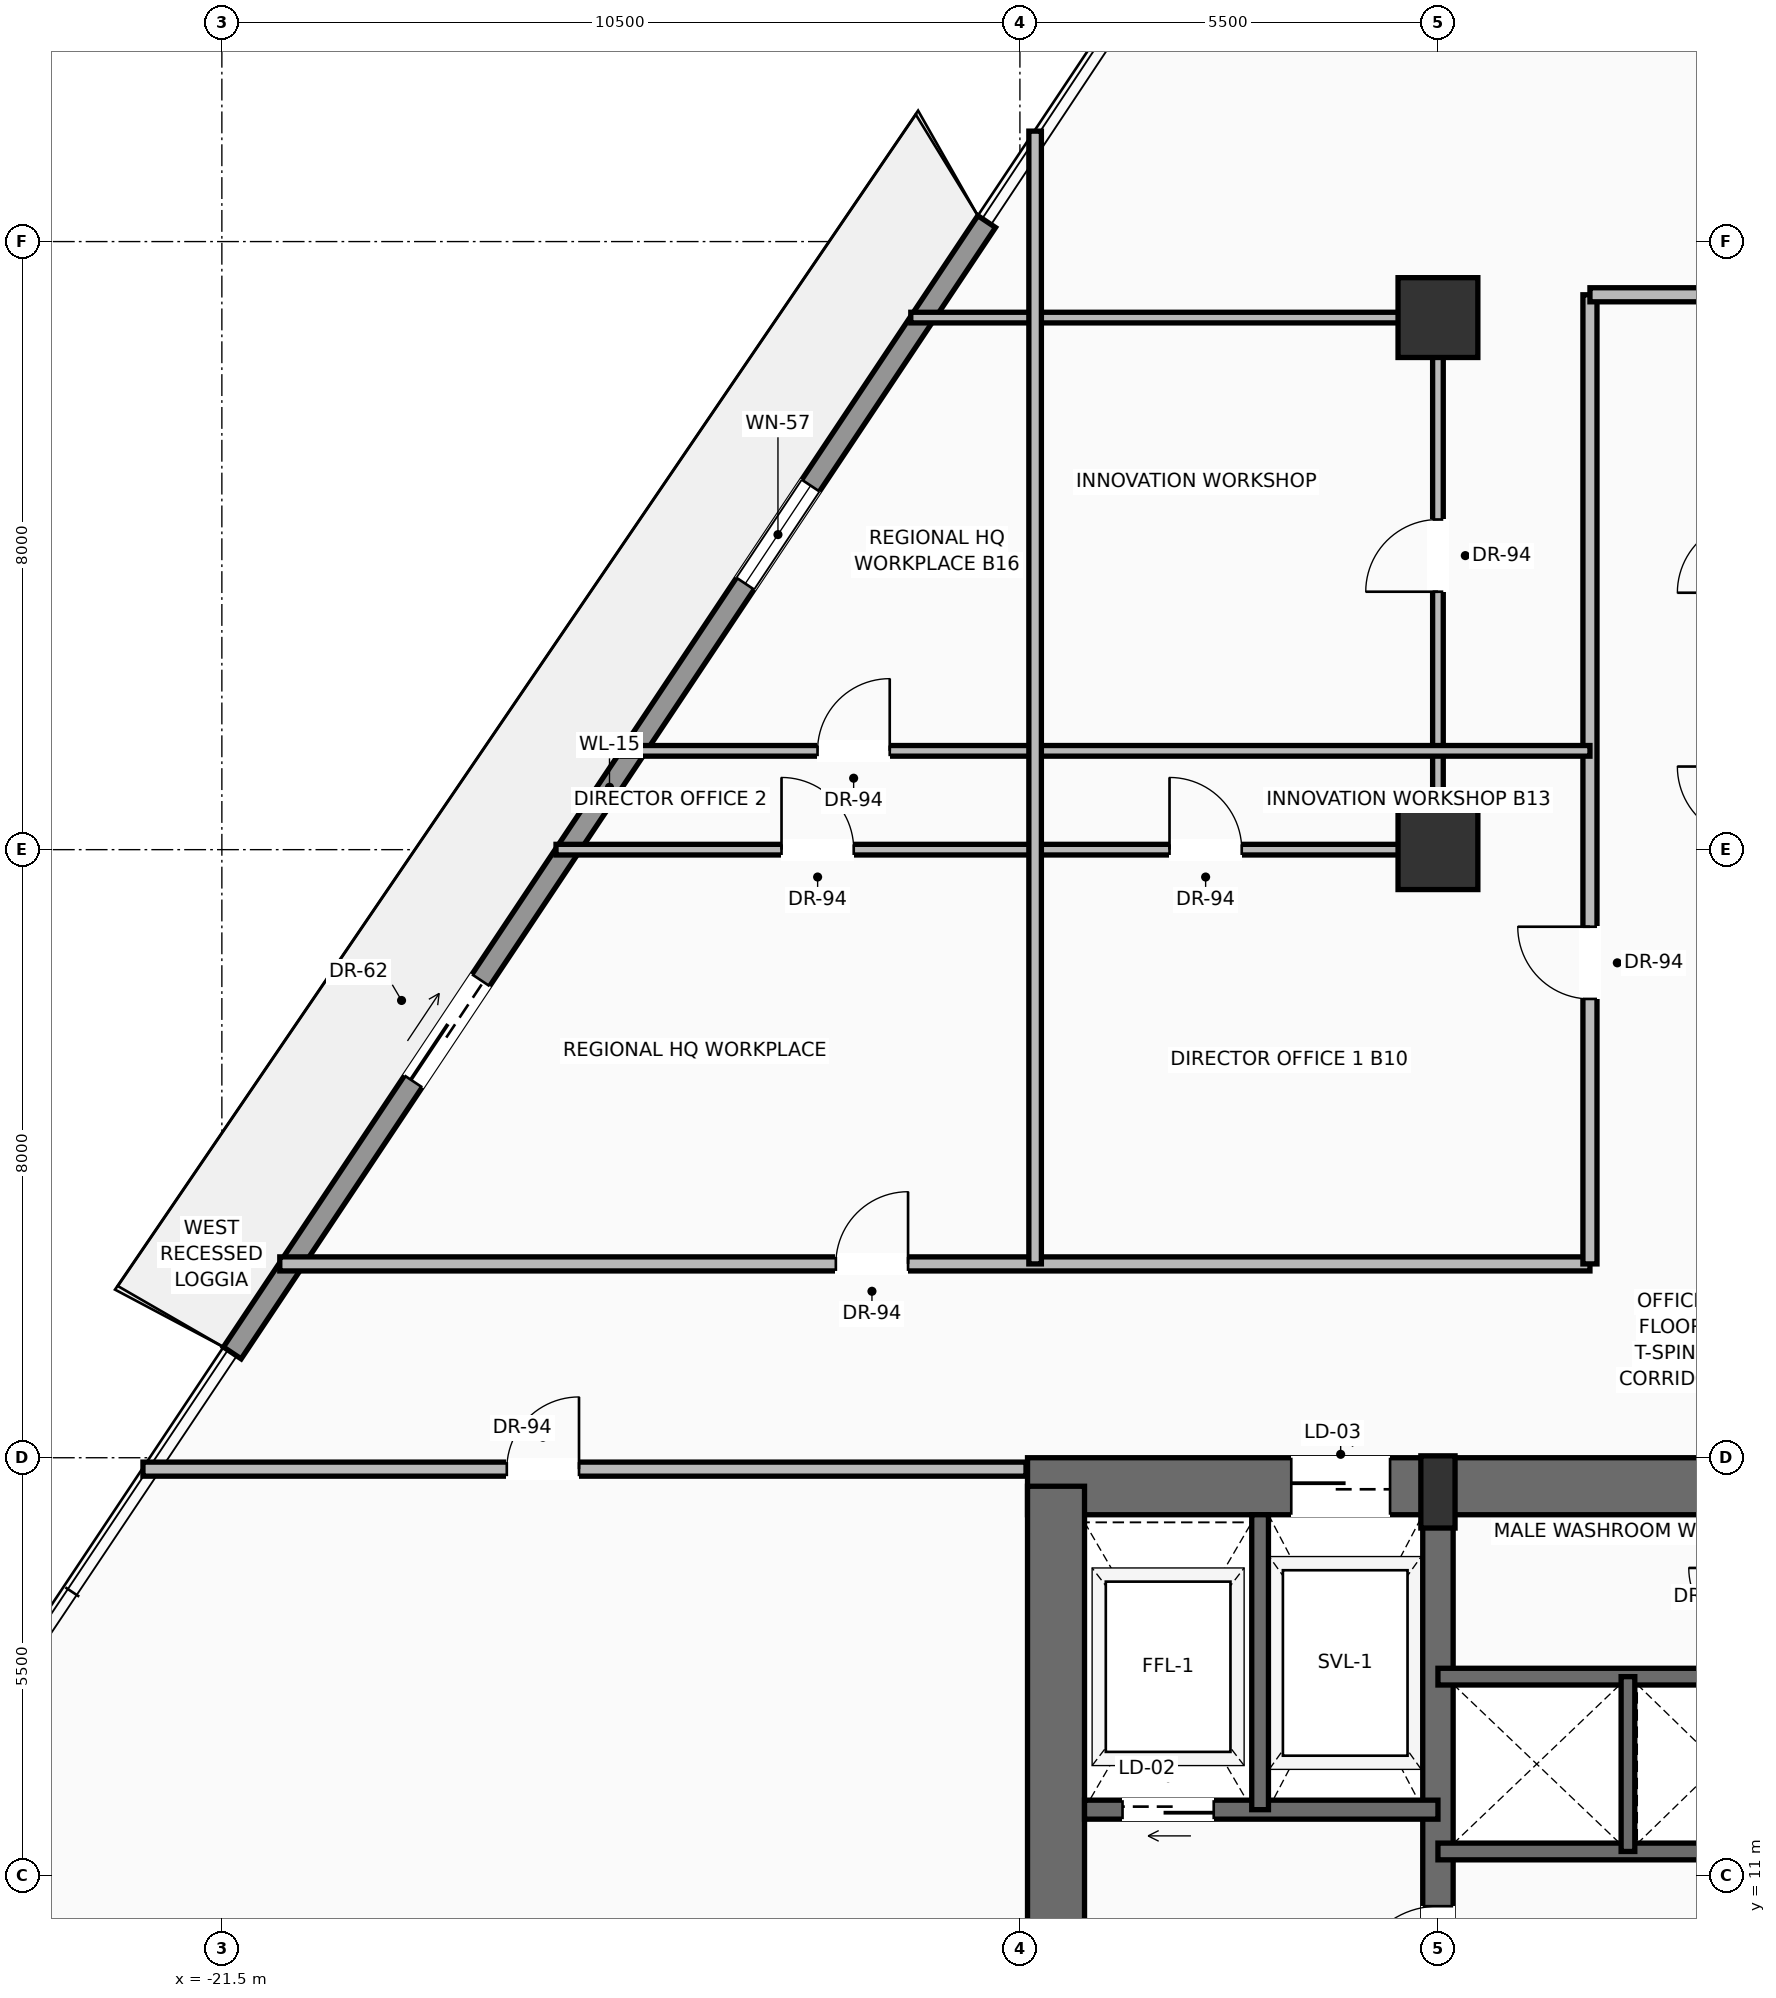
"""IFC4 building model, lengths in metres.
Left out: names, types, materials, properties, quantities, classifications, styles, units other than length and angle.
Written with IfcOpenShell. Run it as: python <this file> out.ifc"""

import sys

from ifc_helpers import new_model, si_unit, direction, frame, frame_2d, origin, origin_2d, place, context, subcontext, project, spatial, rectangle, extrude, source, transform, mapped, element, fill, save


model = new_model("IFC4")
c1 = context("Model", 3, precision=1e-05, world=origin(), true_north=direction((0.0, 1.0)))
c2 = subcontext(c1, "Body", "Model", "MODEL_VIEW")
j1 = project(units=[si_unit("LENGTHUNIT", "METRE"), si_unit("PLANEANGLEUNIT", "RADIAN")], contexts=[c1])
p1 = place(None, origin())
s1 = spatial("IfcSite", under=j1, at=p1, CompositionType="ELEMENT")
p2 = place(p1, origin())
s2 = spatial("IfcBuilding", under=s1, at=p2, CompositionType="ELEMENT")
p3 = place(p2, frame((0.0, 0.0, 109.9)))
s3 = spatial("IfcBuildingStorey", under=s2, at=p3, CompositionType="ELEMENT", Elevation=109.9)
p4 = place(p3, frame((-10.9, 16.125, 0.0), z_axis=(0.0, 0.0, 1.0), x_axis=(1.0, 0.0, 0.0)))
e1 = element("IfcWall", 1, at=p4, inside=s3, PredefinedType="SHEAR", context=c2, shape_type="SweptSolid", body=[
    extrude(rectangle(XDim=21.8, YDim=0.75, at=frame_2d((10.9, 0.0))), origin(), (0.0, 0.0, 1.0), 3.45),
])
p5 = place(p4, frame((3.47, 0.0, 0.0)))
e2 = element("IfcOpeningElement", 2, at=p5, cuts=e1, PredefinedType="OPENING", context=c2, shape_type="SweptSolid", body=[
    extrude(rectangle(XDim=1.3, YDim=2.3, at=frame_2d((0.65, 1.15))), frame((0.0, 0.385, 0.0), z_axis=(0.0, -1.0, 0.0), x_axis=(1.0, 0.0, 0.0)), (0.0, 0.0, 1.0), 0.77),
])
p6 = place(p4, frame((9.9, 0.0, 0.0)))
e3 = element("IfcOpeningElement", 3, at=p6, cuts=e1, PredefinedType="OPENING", context=c2, shape_type="SweptSolid", body=[
    extrude(rectangle(XDim=2.0, YDim=2.4, at=frame_2d((1.0, 1.2))), frame((0.0, 0.385, 0.0), z_axis=(0.0, -1.0, 0.0), x_axis=(1.0, 0.0, 0.0)), (0.0, 0.0, 1.0), 0.77),
])
p7 = place(p3, frame((-10.525, 0.475, 0.0), z_axis=(0.0, 0.0, 1.0), x_axis=(0.0, 1.0, 0.0)))
e4 = element("IfcWall", 4, at=p7, inside=s3, PredefinedType="SHEAR", context=c2, shape_type="SweptSolid", body=[
    extrude(rectangle(XDim=15.65, YDim=0.75, at=frame_2d((7.825, 0.0))), origin(), (0.0, 0.0, 1.0), 3.45),
])
p8 = place(p3, frame((-5.5, 0.475, 0.0), z_axis=(0.0, 0.0, 1.0), x_axis=(0.0, 1.0, 0.0)))
e5 = element("IfcWall", 5, at=p8, inside=s3, PredefinedType="SHEAR", context=c2, shape_type="SweptSolid", body=[
    extrude(rectangle(XDim=15.65, YDim=0.4, at=frame_2d((7.825, 0.0))), origin(), (0.0, 0.0, 1.0), 3.45),
])
p9 = place(p8, frame((9.025, 0.0, 0.0)))
e6 = element("IfcOpeningElement", 6, at=p9, cuts=e5, PredefinedType="OPENING", context=c2, shape_type="SweptSolid", body=[
    extrude(rectangle(XDim=1.1, YDim=2.2, at=frame_2d((0.55, 1.1))), frame((0.0, 0.21, 0.0), z_axis=(0.0, -1.0, 0.0), x_axis=(1.0, 0.0, 0.0)), (0.0, 0.0, 1.0), 0.42),
])
m1 = source(origin(), c2, "Body", "SweptSolid", [
    extrude(rectangle(XDim=0.45, YDim=0.95, at=origin_2d()), origin(), (0.0, 0.0, 1.0), 3.7),
])
p10 = place(p3, frame((-5.5, 16.05, 0.0), z_axis=(0.0, 0.0, 1.0), x_axis=(1.0, 0.0, 0.0)))
e7 = element("IfcColumn", 7, at=p10, inside=s3, PredefinedType="PILASTER", context=c2, shape_type="MappedRepresentation", body=[
    mapped(m1, transform((0.0, 0.0, 0.0), scale=1.0)),
])
m2 = source(origin(), c2, "Body", "SweptSolid", [
    extrude(rectangle(XDim=1.05, YDim=1.05, at=origin_2d()), origin(), (0.0, 0.0, 1.0), 3.7),
])
for number, where, z_axis, x_axis in (
    (8, (-5.5, 24.5, 0.0), (0.0, 0.0, 1.0), (1.0, 0.0, 0.0)),
    (9, (-5.5, 31.5, 0.0), (0.0, 0.0, 1.0), (1.0, 0.0, 0.0)),
):
    element("IfcColumn", number, at=place(p3, frame(where, z_axis=z_axis, x_axis=x_axis)), inside=s3, PredefinedType="COLUMN", context=c2, shape_type="MappedRepresentation", body=[
        mapped(m2, transform((0.0, 0.0, 0.0), scale=1.0)),
    ])
p11 = place(p3, frame((-21.363, 17.879, 0.0), z_axis=(0.0, 0.0, 1.0), x_axis=(0.554797817256, 0.831985205378, 0.0)))
e10 = element("IfcWall", 10, at=p11, inside=s3, PredefinedType="SOLIDWALL", context=c2, shape_type="SweptSolid", body=[
    extrude(rectangle(XDim=17.89, YDim=0.28, at=frame_2d((8.945, 0.0))), origin(), (0.0, 0.0, 1.0), 3.03),
])
p12 = place(p11, frame((4.294, 0.0, 0.0)))
e11 = element("IfcOpeningElement", 11, at=p12, cuts=e10, PredefinedType="OPENING", context=c2, shape_type="SweptSolid", body=[
    extrude(rectangle(XDim=1.6, YDim=2.35, at=frame_2d((0.8, 1.175))), frame((0.0, 0.15, 0.0), z_axis=(0.0, -1.0, 0.0), x_axis=(1.0, 0.0, 0.0)), (0.0, 0.0, 1.0), 0.3),
])
p13 = place(p11, frame((12.165, 0.0, 0.9)))
e12 = element("IfcOpeningElement", 12, at=p13, cuts=e10, PredefinedType="OPENING", context=c2, shape_type="SweptSolid", body=[
    extrude(rectangle(XDim=1.55, YDim=1.85, at=frame_2d((0.775, 0.925))), frame((0.0, 0.15, 0.0), z_axis=(0.0, -1.0, 0.0), x_axis=(1.0, 0.0, 0.0)), (0.0, 0.0, 1.0), 0.3),
])
p14 = place(p3, frame((-5.5, 11.87, 0.0), z_axis=(0.0, 0.0, 1.0), x_axis=(-1.0, 0.0, 0.0)))
e13 = element("IfcWall", 13, at=p14, inside=s3, PredefinedType="SOLIDWALL", context=c2, shape_type="SweptSolid", body=[
    extrude(rectangle(XDim=4.65, YDim=0.25, at=frame_2d((2.325, 0.0))), origin(), (0.0, 0.0, 1.0), 3.45),
])
p15 = place(p14, frame((2.95, 0.0, 0.0)))
e14 = element("IfcOpeningElement", 14, at=p15, cuts=e13, PredefinedType="OPENING", context=c2, shape_type="SweptSolid", body=[
    extrude(rectangle(XDim=1.2, YDim=2.25, at=frame_2d((0.6, 1.125))), frame((0.0, 0.135, 0.0), z_axis=(0.0, -1.0, 0.0), x_axis=(1.0, 0.0, 0.0)), (0.0, 0.0, 1.0), 0.27),
])
p16 = place(p3, frame((-7.84, 11.87, 0.0), z_axis=(0.0, 0.0, 1.0), x_axis=(0.0, 1.0, 0.0)))
e15 = element("IfcWall", 15, at=p16, inside=s3, PredefinedType="SOLIDWALL", context=c2, shape_type="SweptSolid", body=[
    extrude(rectangle(XDim=3.88, YDim=0.22, at=frame_2d((1.94, 0.0))), origin(), (0.0, 0.0, 1.0), 3.45),
])
for number, where, z_axis, x_axis in (
    (16, (-5.5, 11.32, 0.0), (0.0, 0.0, 1.0), (1.0, 0.0, 0.0)),
    (17, (-5.5, 13.62, 0.0), (0.0, 0.0, 1.0), (1.0, 0.0, 0.0)),
):
    element("IfcWall", number, at=place(p3, frame(where, z_axis=z_axis, x_axis=x_axis)), inside=s3, PredefinedType="SOLIDWALL", context=c2, shape_type="SweptSolid", body=[
        extrude(rectangle(XDim=7.32, YDim=0.22, at=frame_2d((3.66, 0.0))), origin(), (0.0, 0.0, 1.0), 3.45),
    ])
p17 = place(p3, frame((-3.0, 11.32, 0.0), z_axis=(0.0, 0.0, 1.0), x_axis=(0.0, 1.0, 0.0)))
e18 = element("IfcWall", 18, at=p17, inside=s3, PredefinedType="SOLIDWALL", context=c2, shape_type="SweptSolid", body=[
    extrude(rectangle(XDim=2.3, YDim=0.18, at=frame_2d((1.15, 0.0))), origin(), (0.0, 0.0, 1.0), 3.45),
])
p18 = place(p3, frame((-22.538, 16.35, 0.0), z_axis=(0.0, 0.0, 1.0), x_axis=(1.0, 0.0, 0.0)))
e19 = element("IfcWall", 19, at=p18, inside=s3, PredefinedType="PARTITIONING", context=c2, shape_type="SweptSolid", body=[
    extrude(rectangle(XDim=11.618, YDim=0.185, at=frame_2d((5.809, 0.0))), origin(), (0.0, 0.0, 1.0), 2.747),
])
p19 = place(p18, frame((4.787, 0.0, 0.0)))
e20 = element("IfcOpeningElement", 20, at=p19, cuts=e19, PredefinedType="OPENING", context=c2, shape_type="SweptSolid", body=[
    extrude(rectangle(XDim=0.95, YDim=2.2, at=frame_2d((0.475, 1.1))), frame((0.0, 0.103, 0.0), z_axis=(0.0, -1.0, 0.0), x_axis=(1.0, 0.0, 0.0)), (0.0, 0.0, 1.0), 0.205),
])
p20 = place(p3, frame((-20.738, 19.05, 0.0), z_axis=(0.0, 0.0, 1.0), x_axis=(1.0, 0.0, 0.0)))
e21 = element("IfcWall", 21, at=p20, inside=s3, PredefinedType="PARTITIONING", context=c2, shape_type="SweptSolid", body=[
    extrude(rectangle(XDim=17.238, YDim=0.185, at=frame_2d((8.619, 0.0))), origin(), (0.0, 0.0, 1.0), 2.747),
])
p21 = place(p20, frame((7.316, 0.0, 0.0)))
e22 = element("IfcOpeningElement", 22, at=p21, cuts=e21, PredefinedType="OPENING", context=c2, shape_type="SweptSolid", body=[
    extrude(rectangle(XDim=0.95, YDim=2.2, at=frame_2d((0.475, 1.1))), frame((0.0, 0.103, 0.0), z_axis=(0.0, -1.0, 0.0), x_axis=(1.0, 0.0, 0.0)), (0.0, 0.0, 1.0), 0.205),
])
p22 = place(p3, frame((-3.5, 19.05, 0.0), z_axis=(0.0, 0.0, 1.0), x_axis=(0.0, 1.0, 0.0)))
e23 = element("IfcWall", 23, at=p22, inside=s3, PredefinedType="PARTITIONING", context=c2, shape_type="SweptSolid", body=[
    extrude(rectangle(XDim=12.75, YDim=0.185, at=frame_2d((6.375, 0.0))), origin(), (0.0, 0.0, 1.0), 2.747),
])
p23 = place(p22, frame((3.486, 0.0, 0.0)))
e24 = element("IfcOpeningElement", 24, at=p23, cuts=e23, PredefinedType="OPENING", context=c2, shape_type="SweptSolid", body=[
    extrude(rectangle(XDim=0.95, YDim=2.2, at=frame_2d((0.475, 1.1))), frame((0.0, 0.103, 0.0), z_axis=(0.0, -1.0, 0.0), x_axis=(1.0, 0.0, 0.0)), (0.0, 0.0, 1.0), 0.205),
])
p24 = place(p3, frame((-3.5, 31.8, 0.0), z_axis=(0.0, 0.0, 1.0), x_axis=(1.0, 0.0, 0.0)))
e25 = element("IfcWall", 25, at=p24, inside=s3, PredefinedType="PARTITIONING", context=c2, shape_type="SweptSolid", body=[
    extrude(rectangle(XDim=2.1, YDim=0.185, at=frame_2d((1.05, 0.0))), origin(), (0.0, 0.0, 1.0), 2.747),
])
p25 = place(p3, frame((-17.104, 24.5, 0.0), z_axis=(0.0, 0.0, 1.0), x_axis=(1.0, 0.0, 0.0)))
e26 = element("IfcWall", 26, at=p25, inside=s3, PredefinedType="PARTITIONING", context=c2, shape_type="SweptSolid", body=[
    extrude(rectangle(XDim=11.604, YDim=0.14, at=frame_2d((5.802, 0.0))), origin(), (0.0, 0.0, 1.0), 2.747),
])
p26 = place(p25, frame((2.967, 0.0, 0.0)))
e27 = element("IfcOpeningElement", 27, at=p26, cuts=e26, PredefinedType="OPENING", context=c2, shape_type="SweptSolid", body=[
    extrude(rectangle(XDim=0.95, YDim=2.2, at=frame_2d((0.475, 1.1))), frame((0.0, 0.08, 0.0), z_axis=(0.0, -1.0, 0.0), x_axis=(1.0, 0.0, 0.0)), (0.0, 0.0, 1.0), 0.16),
])
p27 = place(p25, frame((8.072, 0.0, 0.0)))
e28 = element("IfcOpeningElement", 28, at=p27, cuts=e26, PredefinedType="OPENING", context=c2, shape_type="SweptSolid", body=[
    extrude(rectangle(XDim=0.95, YDim=2.2, at=frame_2d((0.475, 1.1))), frame((0.0, 0.08, 0.0), z_axis=(0.0, -1.0, 0.0), x_axis=(1.0, 0.0, 0.0)), (0.0, 0.0, 1.0), 0.16),
])
p28 = place(p3, frame((-5.5, 24.5, 0.0), z_axis=(0.0, 0.0, 1.0), x_axis=(0.0, 1.0, 0.0)))
e29 = element("IfcWall", 29, at=p28, inside=s3, PredefinedType="PARTITIONING", context=c2, shape_type="SweptSolid", body=[
    extrude(rectangle(XDim=7.0, YDim=0.14, at=frame_2d((3.5, 0.0))), origin(), (0.0, 0.0, 1.0), 2.747),
])
p29 = place(p28, frame((3.393, 0.0, 0.0)))
e30 = element("IfcOpeningElement", 30, at=p29, cuts=e29, PredefinedType="OPENING", context=c2, shape_type="SweptSolid", body=[
    extrude(rectangle(XDim=0.95, YDim=2.2, at=frame_2d((0.475, 1.1))), frame((0.0, 0.08, 0.0), z_axis=(0.0, -1.0, 0.0), x_axis=(1.0, 0.0, 0.0)), (0.0, 0.0, 1.0), 0.16),
])
p30 = place(p3, frame((-12.436, 31.5, 0.0), z_axis=(0.0, 0.0, 1.0), x_axis=(1.0, 0.0, 0.0)))
e31 = element("IfcWall", 31, at=p30, inside=s3, PredefinedType="PARTITIONING", context=c2, shape_type="SweptSolid", body=[
    extrude(rectangle(XDim=6.936, YDim=0.14, at=frame_2d((3.468, 0.0))), origin(), (0.0, 0.0, 1.0), 2.747),
])
p31 = place(p3, frame((-16.237, 25.8, 0.0), z_axis=(0.0, 0.0, 1.0), x_axis=(1.0, 0.0, 0.0)))
e32 = element("IfcWall", 32, at=p31, inside=s3, PredefinedType="PARTITIONING", context=c2, shape_type="SweptSolid", body=[
    extrude(rectangle(XDim=12.737, YDim=0.14, at=frame_2d((6.368, 0.0))), origin(), (0.0, 0.0, 1.0), 2.747),
])
p32 = place(p31, frame((2.574, 0.0, 0.0)))
e33 = element("IfcOpeningElement", 33, at=p32, cuts=e32, PredefinedType="OPENING", context=c2, shape_type="SweptSolid", body=[
    extrude(rectangle(XDim=0.95, YDim=2.2, at=frame_2d((0.475, 1.1))), frame((0.0, 0.08, 0.0), z_axis=(0.0, -1.0, 0.0), x_axis=(1.0, 0.0, 0.0)), (0.0, 0.0, 1.0), 0.16),
])
p33 = place(p3, frame((-10.8, 19.05, 0.0), z_axis=(0.0, 0.0, 1.0), x_axis=(0.0, 1.0, 0.0)))
e34 = element("IfcWall", 34, at=p33, inside=s3, PredefinedType="PARTITIONING", context=c2, shape_type="SweptSolid", body=[
    extrude(rectangle(XDim=14.903, YDim=0.165, at=frame_2d((7.452, 0.0))), origin(), (0.0, 0.0, 1.0), 2.747),
])
m3 = source(origin(), c2, "Body", "SweptSolid", [
    extrude(rectangle(XDim=1.6, YDim=2.35, at=frame_2d((0.8, 1.175))), frame((0.0, 0.025, 0.0), z_axis=(0.0, -1.0, 0.0), x_axis=(1.0, 0.0, 0.0)), (0.0, 0.0, 1.0), 0.05),
])
p34 = place(p12, origin())
e35 = element("IfcDoor", 35, at=p34, inside=s3, OperationType="SLIDING_TO_LEFT", PredefinedType="DOOR", context=c2, shape_type="MappedRepresentation", body=[
    mapped(m3, transform((0.0, 0.0, 0.0), scale=1.0)),
])
fill(e11, e35)
m4 = source(origin(), c2, "Body", "SweptSolid", [
    extrude(rectangle(XDim=1.55, YDim=1.85, at=frame_2d((0.775, 0.925))), frame((0.0, 0.03, 0.0), z_axis=(0.0, -1.0, 0.0), x_axis=(1.0, 0.0, 0.0)), (0.0, 0.0, 1.0), 0.06),
])
p35 = place(p13, origin())
e36 = element("IfcWindow", 36, at=p35, inside=s3, PartitioningType="SINGLE_PANEL", PredefinedType="WINDOW", context=c2, shape_type="MappedRepresentation", body=[
    mapped(m4, transform((0.0, 0.0, 0.0), scale=1.0)),
])
fill(e12, e36)
m5 = source(origin(), c2, "Body", "SweptSolid", [
    extrude(rectangle(XDim=1.1, YDim=2.2, at=frame_2d((0.55, 1.1))), frame((0.0, 0.025, 0.0), z_axis=(0.0, -1.0, 0.0), x_axis=(1.0, 0.0, 0.0)), (0.0, 0.0, 1.0), 0.05),
])
p36 = place(p9, origin())
e37 = element("IfcDoor", 37, at=p36, inside=s3, OperationType="SINGLE_SWING_LEFT", PredefinedType="DOOR", context=c2, shape_type="MappedRepresentation", body=[
    mapped(m5, transform((0.0, 0.0, 0.0), scale=1.0)),
])
fill(e6, e37)
m6 = source(origin(), c2, "Body", "SweptSolid", [
    extrude(rectangle(XDim=1.2, YDim=2.25, at=frame_2d((0.6, 1.125))), frame((0.0, 0.025, 0.0), z_axis=(0.0, -1.0, 0.0), x_axis=(1.0, 0.0, 0.0)), (0.0, 0.0, 1.0), 0.05),
])
p37 = place(p15, origin())
e38 = element("IfcDoor", 38, at=p37, inside=s3, OperationType="SLIDING_TO_LEFT", PredefinedType="DOOR", context=c2, shape_type="MappedRepresentation", body=[
    mapped(m6, transform((0.0, 0.0, 0.0), scale=1.0)),
])
fill(e14, e38)
m7 = source(origin(), c2, "Body", "SweptSolid", [
    extrude(rectangle(XDim=1.3, YDim=2.3, at=frame_2d((0.65, 1.15))), frame((0.0, 0.025, 0.0), z_axis=(0.0, -1.0, 0.0), x_axis=(1.0, 0.0, 0.0)), (0.0, 0.0, 1.0), 0.05),
])
p38 = place(p5, origin())
e39 = element("IfcDoor", 39, at=p38, inside=s3, OperationType="SLIDING_TO_RIGHT", PredefinedType="DOOR", context=c2, shape_type="MappedRepresentation", body=[
    mapped(m7, transform((0.0, 0.0, 0.0), scale=1.0)),
])
fill(e2, e39)
m8 = source(origin(), c2, "Body", "SweptSolid", [
    extrude(rectangle(XDim=0.95, YDim=2.2, at=frame_2d((0.475, 1.1))), frame((0.0, 0.025, 0.0), z_axis=(0.0, -1.0, 0.0), x_axis=(1.0, 0.0, 0.0)), (0.0, 0.0, 1.0), 0.05),
])
p39 = place(p19, origin())
e40 = element("IfcDoor", 40, at=p39, inside=s3, OperationType="SINGLE_SWING_RIGHT", PredefinedType="DOOR", context=c2, shape_type="MappedRepresentation", body=[
    mapped(m8, transform((0.0, 0.0, 0.0), scale=1.0)),
])
fill(e20, e40)
p40 = place(p21, origin())
e41 = element("IfcDoor", 41, at=p40, inside=s3, OperationType="SINGLE_SWING_RIGHT", PredefinedType="DOOR", context=c2, shape_type="MappedRepresentation", body=[
    mapped(m8, transform((0.0, 0.0, 0.0), scale=1.0)),
])
fill(e22, e41)
p41 = place(p23, origin())
e42 = element("IfcDoor", 42, at=p41, inside=s3, OperationType="SINGLE_SWING_RIGHT", PredefinedType="DOOR", context=c2, shape_type="MappedRepresentation", body=[
    mapped(m8, transform((0.0, 0.0, 0.0), scale=1.0)),
])
fill(e24, e42)
p42 = place(p26, origin())
e43 = element("IfcDoor", 43, at=p42, inside=s3, OperationType="SINGLE_SWING_LEFT", PredefinedType="DOOR", context=c2, shape_type="MappedRepresentation", body=[
    mapped(m8, transform((0.0, 0.0, 0.0), scale=1.0)),
])
fill(e27, e43)
p43 = place(p27, origin())
e44 = element("IfcDoor", 44, at=p43, inside=s3, OperationType="SINGLE_SWING_LEFT", PredefinedType="DOOR", context=c2, shape_type="MappedRepresentation", body=[
    mapped(m8, transform((0.0, 0.0, 0.0), scale=1.0)),
])
fill(e28, e44)
p44 = place(p29, origin())
e45 = element("IfcDoor", 45, at=p44, inside=s3, OperationType="SINGLE_SWING_LEFT", PredefinedType="DOOR", context=c2, shape_type="MappedRepresentation", body=[
    mapped(m8, transform((0.0, 0.0, 0.0), scale=1.0)),
])
fill(e30, e45)
p45 = place(p32, origin())
e46 = element("IfcDoor", 46, at=p45, inside=s3, OperationType="SINGLE_SWING_RIGHT", PredefinedType="DOOR", context=c2, shape_type="MappedRepresentation", body=[
    mapped(m8, transform((0.0, 0.0, 0.0), scale=1.0)),
])
fill(e33, e46)
save(model, sys.argv[1])
